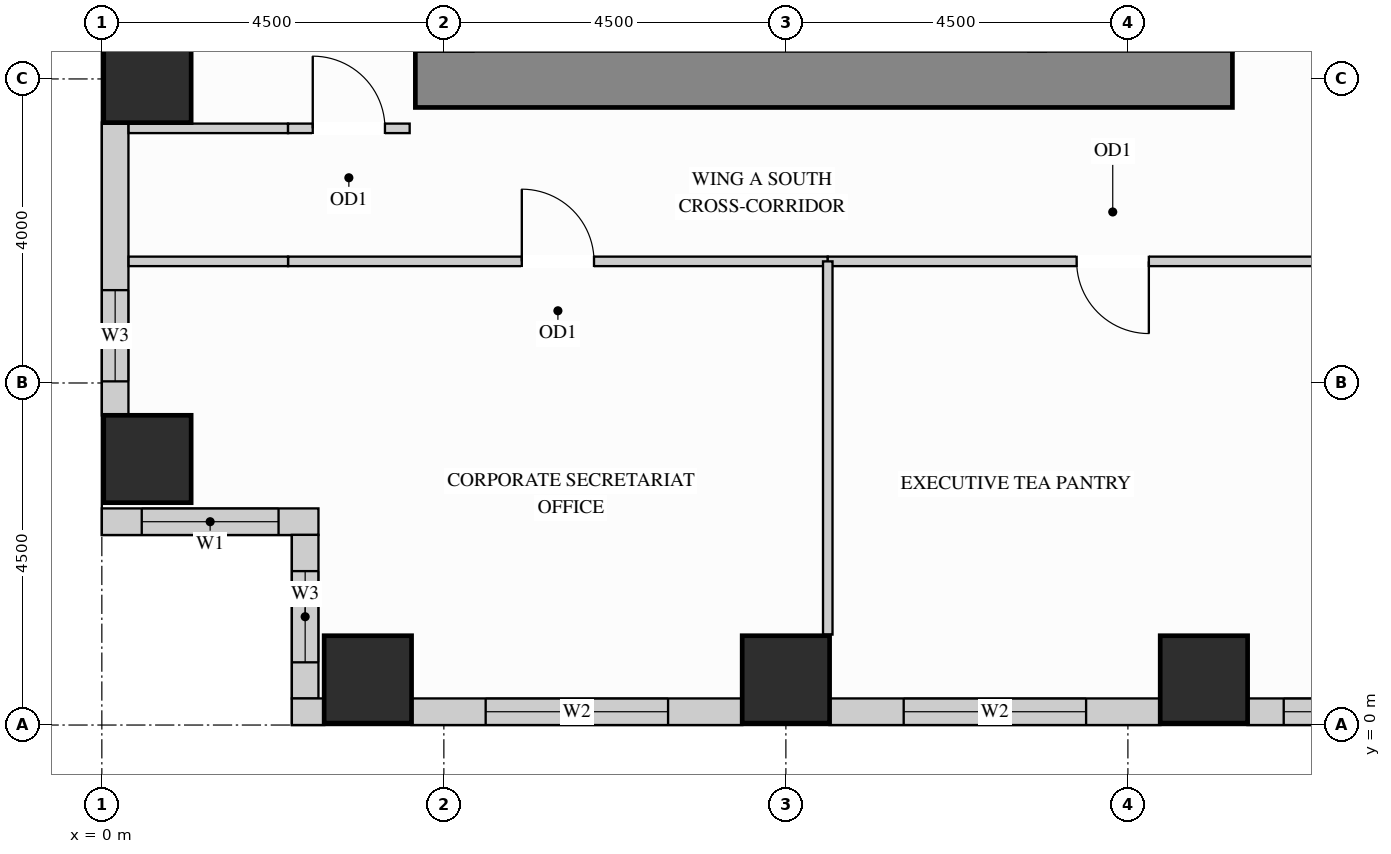
"""IFC4 building model, lengths in metres.
Left out: names, types, materials, properties, quantities, classifications, styles, units other than length and angle.
Written with IfcOpenShell. Run it as: python <this file> out.ifc"""

import sys

from ifc_helpers import new_model, si_unit, direction, frame, frame_2d, origin, origin_2d, place, context, subcontext, project, spatial, rectangle, extrude, source, transform, mapped, element, fill, save


model = new_model("IFC4")
c1 = context("Model", 3, precision=1e-05, world=origin(), true_north=direction((0.0, 1.0)))
c2 = subcontext(c1, "Body", "Model", "MODEL_VIEW")
j1 = project(units=[si_unit("LENGTHUNIT", "METRE"), si_unit("PLANEANGLEUNIT", "RADIAN")], contexts=[c1])
p1 = place(None, origin())
s1 = spatial("IfcSite", under=j1, at=p1, CompositionType="ELEMENT")
p2 = place(p1, origin())
s2 = spatial("IfcBuilding", under=s1, at=p2, CompositionType="ELEMENT")
p3 = place(p2, frame((0.0, 0.0, 113.4)))
s3 = spatial("IfcBuildingStorey", under=s2, at=p3, CompositionType="ELEMENT", Elevation=113.4)
m1 = source(origin(), c2, "Body", "SweptSolid", [
    extrude(rectangle(XDim=1.15, YDim=1.15, at=origin_2d()), origin(), (0.0, 0.0, 1.0), 3.38),
])
for number, where, z_axis, x_axis in (
    (1, (14.5, 0.6, 0.0), (0.0, 0.0, 1.0), (1.0, 0.0, 0.0)),
    (2, (3.5, 0.6, 0.0), (0.0, 0.0, 1.0), (1.0, 0.0, 0.0)),
    (3, (9.0, 0.6, 0.0), (0.0, 0.0, 1.0), (1.0, 0.0, 0.0)),
    (4, (0.6, 3.5, 0.0), (0.0, 0.0, 1.0), (1.0, 0.0, 0.0)),
    (5, (0.6, 8.5, 0.0), (0.0, 0.0, 1.0), (1.0, 0.0, 0.0)),
):
    element("IfcColumn", number, at=place(p3, frame(where, z_axis=z_axis, x_axis=x_axis)), inside=s3, PredefinedType="COLUMN", context=c2, shape_type="MappedRepresentation", body=[
        mapped(m1, transform((0.0, 0.0, 0.0), x_axis=(1.0, 0.0, 0.0), y_axis=(0.0, 1.0, 0.0), z_axis=(0.0, 0.0, 1.0))),
    ])
m2 = source(origin(), c2, "Body", "SweptSolid", [
    extrude(rectangle(XDim=10.75, YDim=0.75, at=frame_2d((5.375, 0.0))), origin(), (0.0, 0.0, 1.0), 3.38),
])
p4 = place(p3, frame((4.125, 8.5, 0.0), z_axis=(0.0, 0.0, 1.0), x_axis=(1.0, 0.0, 0.0)))
e6 = element("IfcWall", 6, at=p4, inside=s3, PredefinedType="SHEAR", context=c2, shape_type="MappedRepresentation", body=[
    mapped(m2, transform((0.0, 0.0, 0.0), x_axis=(1.0, 0.0, 0.0), y_axis=(0.0, 1.0, 0.0), z_axis=(0.0, 0.0, 1.0))),
])
p5 = place(p3, frame((0.175, 7.927, 0.0), z_axis=(0.0, 0.0, 1.0), x_axis=(0.0, -1.0, 0.0)))
e7 = element("IfcWall", 7, at=p5, inside=s3, PredefinedType="SOLIDWALL", context=c2, shape_type="SweptSolid", body=[
    extrude(rectangle(XDim=3.854, YDim=0.35, at=frame_2d((1.927, 0.0))), origin(), (0.0, 0.0, 1.0), 3.365),
])
p6 = place(p5, frame((2.206, 0.0, 0.78)))
e8 = element("IfcOpeningElement", 8, at=p6, cuts=e7, PredefinedType="OPENING", context=c2, shape_type="SweptSolid", body=[
    extrude(rectangle(XDim=1.2, YDim=2.1, at=frame_2d((0.6, 1.05))), frame((0.0, 0.185, 0.0), z_axis=(0.0, -1.0, 0.0), x_axis=(1.0, 0.0, 0.0)), (0.0, 0.0, 1.0), 0.37),
])
p7 = place(p3, frame((0.0, 2.675, 0.0), z_axis=(0.0, 0.0, 1.0), x_axis=(1.0, 0.0, 0.0)))
e9 = element("IfcWall", 9, at=p7, inside=s3, PredefinedType="SOLIDWALL", context=c2, shape_type="SweptSolid", body=[
    extrude(rectangle(XDim=2.85, YDim=0.35, at=frame_2d((1.425, 0.0))), origin(), (0.0, 0.0, 1.0), 3.365),
])
p8 = place(p7, frame((0.525, 0.0, 0.78)))
e10 = element("IfcOpeningElement", 10, at=p8, cuts=e9, PredefinedType="OPENING", context=c2, shape_type="SweptSolid", body=[
    extrude(rectangle(XDim=1.8, YDim=2.1, at=frame_2d((0.9, 1.05))), frame((0.0, 0.185, 0.0), z_axis=(0.0, -1.0, 0.0), x_axis=(1.0, 0.0, 0.0)), (0.0, 0.0, 1.0), 0.37),
])
p9 = place(p3, frame((2.675, 2.502, 0.0), z_axis=(0.0, 0.0, 1.0), x_axis=(0.0, -1.0, 0.0)))
e11 = element("IfcWall", 11, at=p9, inside=s3, PredefinedType="SOLIDWALL", context=c2, shape_type="SweptSolid", body=[
    extrude(rectangle(XDim=2.154, YDim=0.35, at=frame_2d((1.077, 0.0))), origin(), (0.0, 0.0, 1.0), 3.365),
])
p10 = place(p9, frame((0.477, 0.0, 0.78)))
e12 = element("IfcOpeningElement", 12, at=p10, cuts=e11, PredefinedType="OPENING", context=c2, shape_type="SweptSolid", body=[
    extrude(rectangle(XDim=1.2, YDim=2.1, at=frame_2d((0.6, 1.05))), frame((0.0, 0.185, 0.0), z_axis=(0.0, -1.0, 0.0), x_axis=(1.0, 0.0, 0.0)), (0.0, 0.0, 1.0), 0.37),
])
m3 = source(origin(), c2, "Body", "SweptSolid", [
    extrude(rectangle(XDim=0.427, YDim=0.35, at=frame_2d((0.213, 0.0))), origin(), (0.0, 0.0, 1.0), 3.365),
])
p11 = place(p3, frame((2.5, 0.175, 0.0), z_axis=(0.0, 0.0, 1.0), x_axis=(1.0, 0.0, 0.0)))
e13 = element("IfcWall", 13, at=p11, inside=s3, PredefinedType="SOLIDWALL", context=c2, shape_type="MappedRepresentation", body=[
    mapped(m3, transform((0.0, 0.0, 0.0), x_axis=(1.0, 0.0, 0.0), y_axis=(0.0, 1.0, 0.0), z_axis=(0.0, 0.0, 1.0))),
])
p12 = place(p3, frame((4.073, 0.175, 0.0), z_axis=(0.0, 0.0, 1.0), x_axis=(1.0, 0.0, 0.0)))
e14 = element("IfcWall", 14, at=p12, inside=s3, PredefinedType="SOLIDWALL", context=c2, shape_type="SweptSolid", body=[
    extrude(rectangle(XDim=4.354, YDim=0.35, at=frame_2d((2.177, 0.0))), origin(), (0.0, 0.0, 1.0), 3.365),
])
p13 = place(p12, frame((0.977, 0.0, 0.78)))
e15 = element("IfcOpeningElement", 15, at=p13, cuts=e14, PredefinedType="OPENING", context=c2, shape_type="SweptSolid", body=[
    extrude(rectangle(XDim=2.4, YDim=2.1, at=frame_2d((1.2, 1.05))), frame((0.0, 0.185, 0.0), z_axis=(0.0, -1.0, 0.0), x_axis=(1.0, 0.0, 0.0)), (0.0, 0.0, 1.0), 0.37),
])
p14 = place(p3, frame((9.573, 0.175, 0.0), z_axis=(0.0, 0.0, 1.0), x_axis=(1.0, 0.0, 0.0)))
e16 = element("IfcWall", 16, at=p14, inside=s3, PredefinedType="SOLIDWALL", context=c2, shape_type="SweptSolid", body=[
    extrude(rectangle(XDim=4.354, YDim=0.35, at=frame_2d((2.177, 0.0))), origin(), (0.0, 0.0, 1.0), 3.365),
])
p15 = place(p14, frame((0.977, 0.0, 0.78)))
e17 = element("IfcOpeningElement", 17, at=p15, cuts=e16, PredefinedType="OPENING", context=c2, shape_type="SweptSolid", body=[
    extrude(rectangle(XDim=2.4, YDim=2.1, at=frame_2d((1.2, 1.05))), frame((0.0, 0.185, 0.0), z_axis=(0.0, -1.0, 0.0), x_axis=(1.0, 0.0, 0.0)), (0.0, 0.0, 1.0), 0.37),
])
p16 = place(p3, frame((15.073, 0.175, 0.0), z_axis=(0.0, 0.0, 1.0), x_axis=(1.0, 0.0, 0.0)))
e18 = element("IfcWall", 18, at=p16, inside=s3, PredefinedType="SOLIDWALL", context=c2, shape_type="SweptSolid", body=[
    extrude(rectangle(XDim=3.354, YDim=0.35, at=frame_2d((1.677, 0.0))), origin(), (0.0, 0.0, 1.0), 3.365),
])
p17 = place(p16, frame((0.477, 0.0, 0.78)))
e19 = element("IfcOpeningElement", 19, at=p17, cuts=e18, PredefinedType="OPENING", context=c2, shape_type="SweptSolid", body=[
    extrude(rectangle(XDim=2.4, YDim=2.1, at=frame_2d((1.2, 1.05))), frame((0.0, 0.185, 0.0), z_axis=(0.0, -1.0, 0.0), x_axis=(1.0, 0.0, 0.0)), (0.0, 0.0, 1.0), 0.37),
])
m4 = source(origin(), c2, "Body", "SweptSolid", [
    extrude(rectangle(XDim=2.098, YDim=0.125, at=frame_2d((1.049, 0.0))), origin(), (0.0, 0.0, 1.0), 3.365),
])
p18 = place(p3, frame((0.352, 7.85, 0.0), z_axis=(0.0, 0.0, 1.0), x_axis=(1.0, 0.0, 0.0)))
e20 = element("IfcWall", 20, at=p18, inside=s3, PredefinedType="PARTITIONING", context=c2, shape_type="MappedRepresentation", body=[
    mapped(m4, transform((0.0, 0.0, 0.0), x_axis=(1.0, 0.0, 0.0), y_axis=(0.0, 1.0, 0.0), z_axis=(0.0, 0.0, 1.0))),
])
p19 = place(p3, frame((2.45, 7.85, 0.0), z_axis=(0.0, 0.0, 1.0), x_axis=(1.0, 0.0, 0.0)))
e21 = element("IfcWall", 21, at=p19, inside=s3, PredefinedType="PARTITIONING", context=c2, shape_type="SweptSolid", body=[
    extrude(rectangle(XDim=1.6, YDim=0.125, at=frame_2d((0.8, 0.0))), origin(), (0.0, 0.0, 1.0), 3.365),
])
p20 = place(p19, frame((0.325, 0.0, 0.0)))
e22 = element("IfcOpeningElement", 22, at=p20, cuts=e21, PredefinedType="OPENING", context=c2, shape_type="SweptSolid", body=[
    extrude(rectangle(XDim=0.95, YDim=2.15, at=frame_2d((0.475, 1.075))), frame((0.0, 0.073, 0.0), z_axis=(0.0, -1.0, 0.0), x_axis=(1.0, 0.0, 0.0)), (0.0, 0.0, 1.0), 0.145),
])
p21 = place(p3, frame((2.45, 6.1, 0.0), z_axis=(0.0, 0.0, 1.0), x_axis=(1.0, 0.0, 0.0)))
e23 = element("IfcWall", 23, at=p21, inside=s3, PredefinedType="PARTITIONING", context=c2, shape_type="SweptSolid", body=[
    extrude(rectangle(XDim=7.101, YDim=0.125, at=frame_2d((3.551, 0.0))), origin(), (0.0, 0.0, 1.0), 3.365),
])
p22 = place(p21, frame((3.075, 0.0, 0.0)))
e24 = element("IfcOpeningElement", 24, at=p22, cuts=e23, PredefinedType="OPENING", context=c2, shape_type="SweptSolid", body=[
    extrude(rectangle(XDim=0.95, YDim=2.15, at=frame_2d((0.475, 1.075))), frame((0.0, 0.073, 0.0), z_axis=(0.0, -1.0, 0.0), x_axis=(1.0, 0.0, 0.0)), (0.0, 0.0, 1.0), 0.145),
])
p23 = place(p3, frame((9.551, 6.1, 0.0), z_axis=(0.0, 0.0, 1.0), x_axis=(1.0, 0.0, 0.0)))
e25 = element("IfcWall", 25, at=p23, inside=s3, PredefinedType="PARTITIONING", context=c2, shape_type="SweptSolid", body=[
    extrude(rectangle(XDim=7.499, YDim=0.125, at=frame_2d((3.75, 0.0))), origin(), (0.0, 0.0, 1.0), 3.365),
])
p24 = place(p23, frame((3.274, 0.0, 0.0)))
e26 = element("IfcOpeningElement", 26, at=p24, cuts=e25, PredefinedType="OPENING", context=c2, shape_type="SweptSolid", body=[
    extrude(rectangle(XDim=0.95, YDim=2.15, at=frame_2d((0.475, 1.075))), frame((0.0, 0.073, 0.0), z_axis=(0.0, -1.0, 0.0), x_axis=(1.0, 0.0, 0.0)), (0.0, 0.0, 1.0), 0.145),
])
p25 = place(p3, frame((0.352, 6.1, 0.0), z_axis=(0.0, 0.0, 1.0), x_axis=(1.0, 0.0, 0.0)))
e27 = element("IfcWall", 27, at=p25, inside=s3, PredefinedType="PARTITIONING", context=c2, shape_type="MappedRepresentation", body=[
    mapped(m4, transform((0.0, 0.0, 0.0), x_axis=(1.0, 0.0, 0.0), y_axis=(0.0, 1.0, 0.0), z_axis=(0.0, 0.0, 1.0))),
])
m5 = source(origin(), c2, "Body", "SweptSolid", [
    extrude(rectangle(XDim=4.91, YDim=0.125, at=frame_2d((2.455, 0.0))), origin(), (0.0, 0.0, 1.0), 3.365),
])
p26 = place(p3, frame((9.551, 1.19, 0.0), z_axis=(0.0, 0.0, 1.0), x_axis=(0.0, 1.0, 0.0)))
e28 = element("IfcWall", 28, at=p26, inside=s3, PredefinedType="PARTITIONING", context=c2, shape_type="MappedRepresentation", body=[
    mapped(m5, transform((0.0, 0.0, 0.0), x_axis=(1.0, 0.0, 0.0), y_axis=(0.0, 1.0, 0.0), z_axis=(0.0, 0.0, 1.0))),
])
m6 = source(origin(), c2, "Body", "SweptSolid", [
    extrude(rectangle(XDim=0.95, YDim=2.15, at=frame_2d((0.475, 1.075))), frame((0.0, 0.025, 0.0), z_axis=(0.0, -1.0, 0.0), x_axis=(1.0, 0.0, 0.0)), (0.0, 0.0, 1.0), 0.05),
])
p27 = place(p22, origin())
e29 = element("IfcDoor", 29, at=p27, inside=s3, OperationType="SINGLE_SWING_LEFT", PredefinedType="DOOR", context=c2, shape_type="MappedRepresentation", body=[
    mapped(m6, transform((0.0, 0.0, 0.0), x_axis=(1.0, 0.0, 0.0), y_axis=(0.0, 1.0, 0.0), z_axis=(0.0, 0.0, 1.0))),
])
fill(e24, e29)
p28 = place(p24, origin())
e30 = element("IfcDoor", 30, at=p28, inside=s3, OperationType="SINGLE_SWING_RIGHT", PredefinedType="DOOR", context=c2, shape_type="MappedRepresentation", body=[
    mapped(m6, transform((0.0, 0.0, 0.0), x_axis=(1.0, 0.0, 0.0), y_axis=(0.0, 1.0, 0.0), z_axis=(0.0, 0.0, 1.0))),
])
fill(e26, e30)
p29 = place(p20, origin())
e31 = element("IfcDoor", 31, at=p29, inside=s3, OperationType="SINGLE_SWING_LEFT", PredefinedType="DOOR", context=c2, shape_type="MappedRepresentation", body=[
    mapped(m6, transform((0.0, 0.0, 0.0), x_axis=(1.0, 0.0, 0.0), y_axis=(0.0, 1.0, 0.0), z_axis=(0.0, 0.0, 1.0))),
])
fill(e22, e31)
m7 = source(origin(), c2, "Body", "SweptSolid", [
    extrude(rectangle(XDim=1.8, YDim=2.1, at=frame_2d((0.9, 1.05))), frame((0.0, 0.03, 0.0), z_axis=(0.0, -1.0, 0.0), x_axis=(1.0, 0.0, 0.0)), (0.0, 0.0, 1.0), 0.06),
])
p30 = place(p8, origin())
e32 = element("IfcWindow", 32, at=p30, inside=s3, PartitioningType="SINGLE_PANEL", PredefinedType="WINDOW", context=c2, shape_type="MappedRepresentation", body=[
    mapped(m7, transform((0.0, 0.0, 0.0), x_axis=(1.0, 0.0, 0.0), y_axis=(0.0, 1.0, 0.0), z_axis=(0.0, 0.0, 1.0))),
])
fill(e10, e32)
m8 = source(origin(), c2, "Body", "SweptSolid", [
    extrude(rectangle(XDim=2.4, YDim=2.1, at=frame_2d((1.2, 1.05))), frame((0.0, 0.03, 0.0), z_axis=(0.0, -1.0, 0.0), x_axis=(1.0, 0.0, 0.0)), (0.0, 0.0, 1.0), 0.06),
])
p31 = place(p13, origin())
e33 = element("IfcWindow", 33, at=p31, inside=s3, PartitioningType="SINGLE_PANEL", PredefinedType="WINDOW", context=c2, shape_type="MappedRepresentation", body=[
    mapped(m8, transform((0.0, 0.0, 0.0), x_axis=(1.0, 0.0, 0.0), y_axis=(0.0, 1.0, 0.0), z_axis=(0.0, 0.0, 1.0))),
])
fill(e15, e33)
p32 = place(p15, origin())
e34 = element("IfcWindow", 34, at=p32, inside=s3, PartitioningType="SINGLE_PANEL", PredefinedType="WINDOW", context=c2, shape_type="MappedRepresentation", body=[
    mapped(m8, transform((0.0, 0.0, 0.0), x_axis=(1.0, 0.0, 0.0), y_axis=(0.0, 1.0, 0.0), z_axis=(0.0, 0.0, 1.0))),
])
fill(e17, e34)
p33 = place(p17, origin())
e35 = element("IfcWindow", 35, at=p33, inside=s3, PartitioningType="SINGLE_PANEL", PredefinedType="WINDOW", context=c2, shape_type="MappedRepresentation", body=[
    mapped(m8, transform((0.0, 0.0, 0.0), x_axis=(1.0, 0.0, 0.0), y_axis=(0.0, 1.0, 0.0), z_axis=(0.0, 0.0, 1.0))),
])
fill(e19, e35)
m9 = source(origin(), c2, "Body", "SweptSolid", [
    extrude(rectangle(XDim=1.2, YDim=2.1, at=frame_2d((0.6, 1.05))), frame((0.0, 0.03, 0.0), z_axis=(0.0, -1.0, 0.0), x_axis=(1.0, 0.0, 0.0)), (0.0, 0.0, 1.0), 0.06),
])
p34 = place(p6, origin())
e36 = element("IfcWindow", 36, at=p34, inside=s3, PartitioningType="SINGLE_PANEL", PredefinedType="WINDOW", context=c2, shape_type="MappedRepresentation", body=[
    mapped(m9, transform((0.0, 0.0, 0.0), x_axis=(1.0, 0.0, 0.0), y_axis=(0.0, 1.0, 0.0), z_axis=(0.0, 0.0, 1.0))),
])
fill(e8, e36)
p35 = place(p10, origin())
e37 = element("IfcWindow", 37, at=p35, inside=s3, PartitioningType="SINGLE_PANEL", PredefinedType="WINDOW", context=c2, shape_type="MappedRepresentation", body=[
    mapped(m9, transform((0.0, 0.0, 0.0), x_axis=(1.0, 0.0, 0.0), y_axis=(0.0, 1.0, 0.0), z_axis=(0.0, 0.0, 1.0))),
])
fill(e12, e37)
save(model, sys.argv[1])
